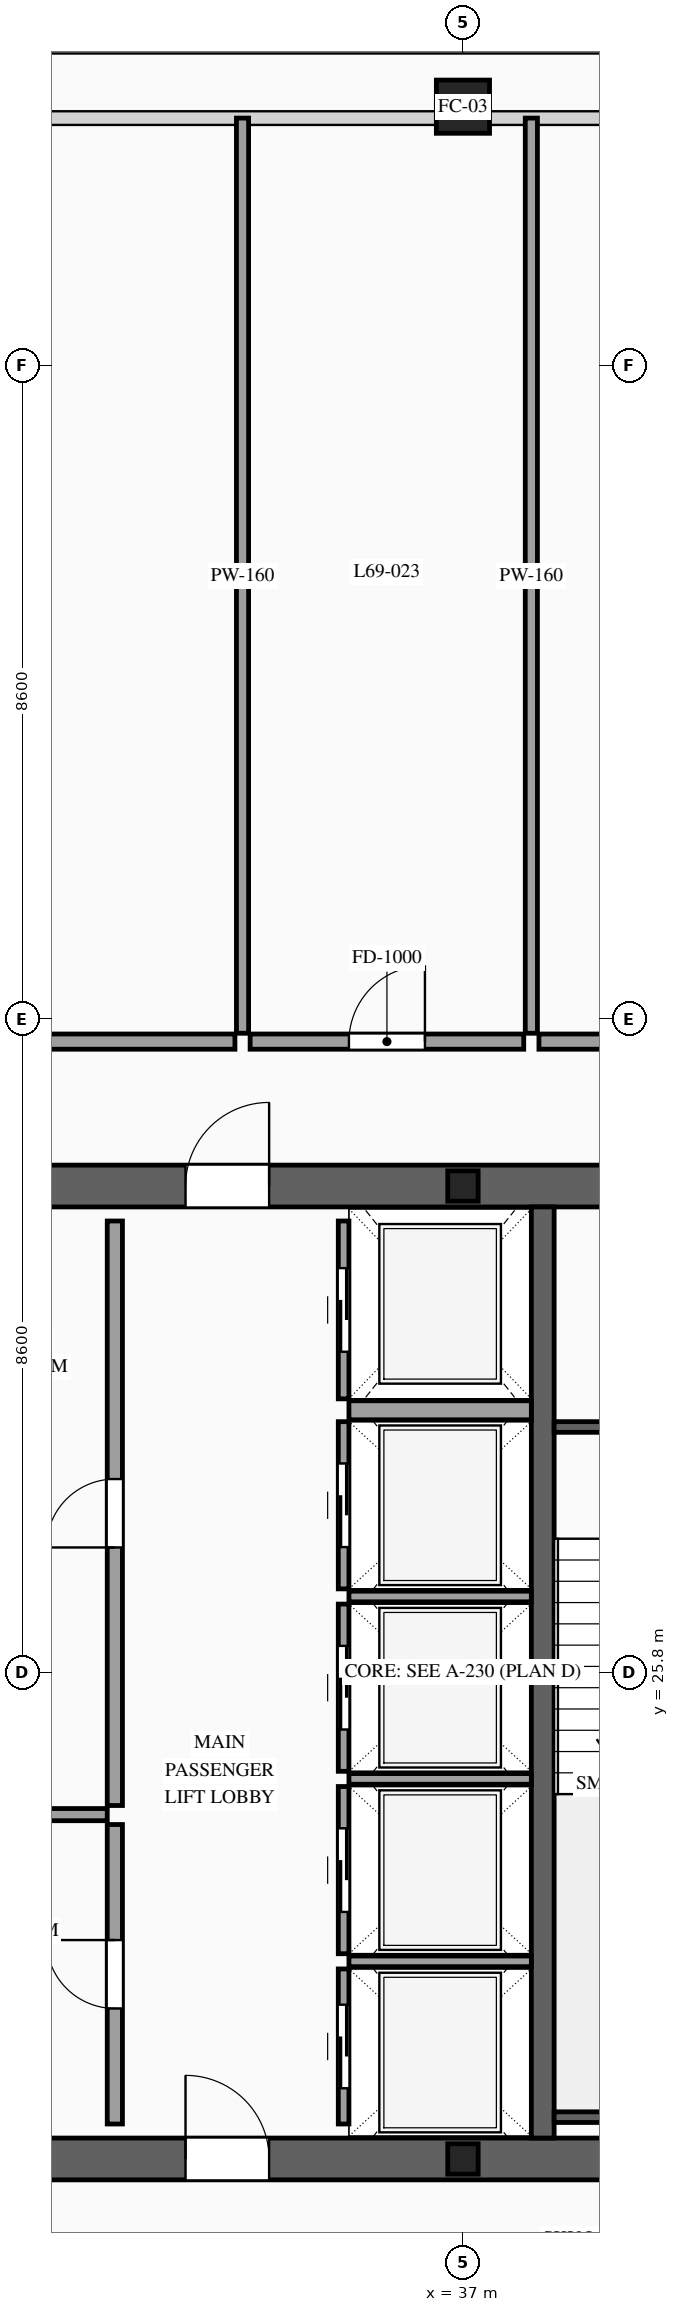
"""IFC4 building model, lengths in metres.
Left out: names, types, materials, properties, quantities, classifications, styles, units other than length and angle.
Written with IfcOpenShell. Run it as: python <this file> out.ifc"""

import sys

from ifc_helpers import new_model, si_unit, direction, frame, frame_2d, origin, origin_2d, place, context, subcontext, project, spatial, rectangle, hollow_rectangle, i_section, extrude, source, transform, mapped, element, fill, save


model = new_model("IFC4")
c1 = context("Model", 3, precision=1e-05, world=origin(), true_north=direction((0.0, 1.0)))
c2 = subcontext(c1, "Body", "Model", "MODEL_VIEW")
j1 = project(units=[si_unit("LENGTHUNIT", "METRE"), si_unit("PLANEANGLEUNIT", "RADIAN")], contexts=[c1])
p1 = place(None, origin())
s1 = spatial("IfcSite", under=j1, at=p1, CompositionType="ELEMENT")
p2 = place(p1, origin())
s2 = spatial("IfcBuilding", under=s1, at=p2, CompositionType="ELEMENT")
p3 = place(p2, frame((0.0, 0.0, 259.1)))
s3 = spatial("IfcBuildingStorey", under=s2, at=p3, CompositionType="ELEMENT", Elevation=259.1)
p4 = place(p3, frame((23.525, 19.4, 0.0), z_axis=(0.0, 0.0, 1.0), x_axis=(1.0, 0.0, 0.0)))
e1 = element("IfcWall", 1, at=p4, inside=s3, PredefinedType="SHEAR", context=c2, shape_type="SweptSolid", body=[
    extrude(rectangle(XDim=26.95, YDim=0.55, at=frame_2d((13.475, 0.0))), origin(), (0.0, 0.0, 1.0), 4.4),
])
p5 = place(p4, frame((1.925, 0.0, 0.0)))
e2 = element("IfcOpeningElement", 2, at=p5, cuts=e1, PredefinedType="OPENING", context=c2, shape_type="SweptSolid", body=[
    extrude(rectangle(XDim=1.1, YDim=2.2, at=frame_2d((0.55, 1.1))), frame((0.0, 0.29, 0.0), z_axis=(0.0, -1.0, 0.0), x_axis=(1.0, 0.0, 0.0)), (0.0, 0.0, 1.0), 0.58),
])
p6 = place(p4, frame((9.825, 0.0, 0.0)))
e3 = element("IfcOpeningElement", 3, at=p6, cuts=e1, PredefinedType="OPENING", context=c2, shape_type="SweptSolid", body=[
    extrude(rectangle(XDim=1.1, YDim=2.2, at=frame_2d((0.55, 1.1))), frame((0.0, 0.29, 0.0), z_axis=(0.0, -1.0, 0.0), x_axis=(1.0, 0.0, 0.0)), (0.0, 0.0, 1.0), 0.58),
])
p7 = place(p4, frame((23.025, 0.0, 0.0)))
e4 = element("IfcOpeningElement", 4, at=p7, cuts=e1, PredefinedType="OPENING", context=c2, shape_type="SweptSolid", body=[
    extrude(rectangle(XDim=1.1, YDim=2.2, at=frame_2d((0.55, 1.1))), frame((0.0, 0.29, 0.0), z_axis=(0.0, -1.0, 0.0), x_axis=(1.0, 0.0, 0.0)), (0.0, 0.0, 1.0), 0.58),
])
p8 = place(p4, frame((19.645, 0.0, 0.0)))
e5 = element("IfcOpeningElement", 5, at=p8, cuts=e1, PredefinedType="OPENING", context=c2, shape_type="SweptSolid", body=[
    extrude(rectangle(XDim=0.9, YDim=2.15, at=frame_2d((0.45, 1.075))), frame((0.0, 0.29, 0.0), z_axis=(0.0, -1.0, 0.0), x_axis=(1.0, 0.0, 0.0)), (0.0, 0.0, 1.0), 0.58),
])
p9 = place(p4, frame((18.205, 0.0, 0.0)))
e6 = element("IfcOpeningElement", 6, at=p9, cuts=e1, PredefinedType="OPENING", context=c2, shape_type="SweptSolid", body=[
    extrude(rectangle(XDim=0.9, YDim=2.15, at=frame_2d((0.45, 1.075))), frame((0.0, 0.29, 0.0), z_axis=(0.0, -1.0, 0.0), x_axis=(1.0, 0.0, 0.0)), (0.0, 0.0, 1.0), 0.58),
])
p10 = place(p3, frame((23.525, 32.2, 0.0), z_axis=(0.0, 0.0, 1.0), x_axis=(1.0, 0.0, 0.0)))
e7 = element("IfcWall", 7, at=p10, inside=s3, PredefinedType="SHEAR", context=c2, shape_type="SweptSolid", body=[
    extrude(rectangle(XDim=26.95, YDim=0.55, at=frame_2d((13.475, 0.0))), origin(), (0.0, 0.0, 1.0), 4.4),
])
p11 = place(p10, frame((4.545, 0.0, 0.0)))
e8 = element("IfcOpeningElement", 8, at=p11, cuts=e7, PredefinedType="OPENING", context=c2, shape_type="SweptSolid", body=[
    extrude(rectangle(XDim=0.9, YDim=2.15, at=frame_2d((0.45, 1.075))), frame((0.0, 0.29, 0.0), z_axis=(0.0, -1.0, 0.0), x_axis=(1.0, 0.0, 0.0)), (0.0, 0.0, 1.0), 0.58),
])
p12 = place(p10, frame((9.825, 0.0, 0.0)))
e9 = element("IfcOpeningElement", 9, at=p12, cuts=e7, PredefinedType="OPENING", context=c2, shape_type="SweptSolid", body=[
    extrude(rectangle(XDim=1.1, YDim=2.2, at=frame_2d((0.55, 1.1))), frame((0.0, 0.29, 0.0), z_axis=(0.0, -1.0, 0.0), x_axis=(1.0, 0.0, 0.0)), (0.0, 0.0, 1.0), 0.58),
])
p13 = place(p10, frame((15.675, 0.0, 0.0)))
e10 = element("IfcOpeningElement", 10, at=p13, cuts=e7, PredefinedType="OPENING", context=c2, shape_type="SweptSolid", body=[
    extrude(rectangle(XDim=1.1, YDim=2.2, at=frame_2d((0.55, 1.1))), frame((0.0, 0.29, 0.0), z_axis=(0.0, -1.0, 0.0), x_axis=(1.0, 0.0, 0.0)), (0.0, 0.0, 1.0), 0.58),
])
p14 = place(p10, frame((18.775, 0.0, 0.0)))
e11 = element("IfcOpeningElement", 11, at=p14, cuts=e7, PredefinedType="OPENING", context=c2, shape_type="SweptSolid", body=[
    extrude(rectangle(XDim=1.1, YDim=2.2, at=frame_2d((0.55, 1.1))), frame((0.0, 0.29, 0.0), z_axis=(0.0, -1.0, 0.0), x_axis=(1.0, 0.0, 0.0)), (0.0, 0.0, 1.0), 0.58),
])
m1 = source(origin(), c2, "Body", "SweptSolid", [
    extrude(rectangle(XDim=12.25, YDim=0.3, at=frame_2d((6.125, 0.0))), origin(), (0.0, 0.0, 1.0), 4.4),
])
p15 = place(p3, frame((38.05, 19.675, 0.0), z_axis=(0.0, 0.0, 1.0), x_axis=(0.0, 1.0, 0.0)))
e12 = element("IfcWall", 12, at=p15, inside=s3, PredefinedType="SOLIDWALL", context=c2, shape_type="MappedRepresentation", body=[
    mapped(m1, transform((0.0, 0.0, 0.0), scale=1.0)),
])
m2 = source(origin(), c2, "Body", "SweptSolid", [
    extrude(i_section(OverallWidth=0.4, OverallDepth=0.4, WebThickness=0.013, FlangeThickness=0.021, at=origin_2d()), origin(), (0.0, 0.0, 1.0), 4.4),
])
for number, where, z_axis, x_axis in (
    (13, (37.0, 19.4, 0.0), (0.0, 0.0, 1.0), (1.0, 0.0, 0.0)),
    (14, (37.0, 32.2, 0.0), (0.0, 0.0, 1.0), (1.0, 0.0, 0.0)),
):
    element("IfcColumn", number, at=place(p3, frame(where, z_axis=z_axis, x_axis=x_axis)), inside=s3, PredefinedType="COLUMN", context=c2, shape_type="MappedRepresentation", body=[
        mapped(m2, transform((0.0, 0.0, 0.0), scale=1.0)),
    ])
m3 = source(origin(), c2, "Body", "SweptSolid", [
    extrude(hollow_rectangle(XDim=0.7, YDim=0.7, WallThickness=0.032, at=origin_2d()), origin(), (0.0, 0.0, 1.0), 4.4),
])
p16 = place(p3, frame((37.0, 46.4, 0.0), z_axis=(0.0, 0.0, 1.0), x_axis=(1.0, 0.0, 0.0)))
e15 = element("IfcColumn", 15, at=p16, inside=s3, PredefinedType="COLUMN", context=c2, shape_type="MappedRepresentation", body=[
    mapped(m3, transform((0.0, 0.0, 0.0), scale=1.0)),
])
p17 = place(p3, frame((35.43, 19.86, 0.0), z_axis=(0.0, 0.0, 1.0), x_axis=(0.0, 1.0, 0.0)))
e16 = element("IfcWall", 16, at=p17, inside=s3, PredefinedType="SOLIDWALL", context=c2, shape_type="SweptSolid", body=[
    extrude(rectangle(XDim=2.04, YDim=0.14, at=frame_2d((1.02, 0.0))), origin(), (0.0, 0.0, 1.0), 4.12),
])
p18 = place(p17, frame((0.47, 0.0, 0.0)))
e17 = element("IfcOpeningElement", 17, at=p18, cuts=e16, PredefinedType="OPENING", context=c2, shape_type="SweptSolid", body=[
    extrude(rectangle(XDim=1.1, YDim=2.2, at=frame_2d((0.55, 1.1))), frame((0.0, 0.085, 0.0), z_axis=(0.0, -1.0, 0.0), x_axis=(1.0, 0.0, 0.0)), (0.0, 0.0, 1.0), 0.17),
])
m4 = source(origin(), c2, "Body", "SweptSolid", [
    extrude(rectangle(XDim=2.4, YDim=0.14, at=frame_2d((1.2, 0.0))), origin(), (0.0, 0.0, 1.0), 4.12),
])
p19 = place(p3, frame((35.5, 22.0, 0.0), z_axis=(0.0, 0.0, 1.0), x_axis=(1.0, 0.0, 0.0)))
e18 = element("IfcWall", 18, at=p19, inside=s3, PredefinedType="SOLIDWALL", context=c2, shape_type="MappedRepresentation", body=[
    mapped(m4, transform((0.0, 0.0, 0.0), scale=1.0)),
])
p20 = place(p3, frame((35.43, 22.1, 0.0), z_axis=(0.0, 0.0, 1.0), x_axis=(0.0, 1.0, 0.0)))
e19 = element("IfcWall", 19, at=p20, inside=s3, PredefinedType="SOLIDWALL", context=c2, shape_type="SweptSolid", body=[
    extrude(rectangle(XDim=2.2, YDim=0.14, at=frame_2d((1.1, 0.0))), origin(), (0.0, 0.0, 1.0), 4.12),
])
p21 = place(p20, frame((0.55, 0.0, 0.0)))
e20 = element("IfcOpeningElement", 20, at=p21, cuts=e19, PredefinedType="OPENING", context=c2, shape_type="SweptSolid", body=[
    extrude(rectangle(XDim=1.1, YDim=2.2, at=frame_2d((0.55, 1.1))), frame((0.0, 0.085, 0.0), z_axis=(0.0, -1.0, 0.0), x_axis=(1.0, 0.0, 0.0)), (0.0, 0.0, 1.0), 0.17),
])
p22 = place(p3, frame((35.5, 24.4, 0.0), z_axis=(0.0, 0.0, 1.0), x_axis=(1.0, 0.0, 0.0)))
e21 = element("IfcWall", 21, at=p22, inside=s3, PredefinedType="SOLIDWALL", context=c2, shape_type="MappedRepresentation", body=[
    mapped(m4, transform((0.0, 0.0, 0.0), scale=1.0)),
])
p23 = place(p3, frame((35.43, 24.5, 0.0), z_axis=(0.0, 0.0, 1.0), x_axis=(0.0, 1.0, 0.0)))
e22 = element("IfcWall", 22, at=p23, inside=s3, PredefinedType="SOLIDWALL", context=c2, shape_type="SweptSolid", body=[
    extrude(rectangle(XDim=2.2, YDim=0.14, at=frame_2d((1.1, 0.0))), origin(), (0.0, 0.0, 1.0), 4.12),
])
p24 = place(p23, frame((0.55, 0.0, 0.0)))
e23 = element("IfcOpeningElement", 23, at=p24, cuts=e22, PredefinedType="OPENING", context=c2, shape_type="SweptSolid", body=[
    extrude(rectangle(XDim=1.1, YDim=2.2, at=frame_2d((0.55, 1.1))), frame((0.0, 0.085, 0.0), z_axis=(0.0, -1.0, 0.0), x_axis=(1.0, 0.0, 0.0)), (0.0, 0.0, 1.0), 0.17),
])
p25 = place(p3, frame((35.5, 26.8, 0.0), z_axis=(0.0, 0.0, 1.0), x_axis=(1.0, 0.0, 0.0)))
e24 = element("IfcWall", 24, at=p25, inside=s3, PredefinedType="SOLIDWALL", context=c2, shape_type="MappedRepresentation", body=[
    mapped(m4, transform((0.0, 0.0, 0.0), scale=1.0)),
])
p26 = place(p3, frame((35.43, 26.9, 0.0), z_axis=(0.0, 0.0, 1.0), x_axis=(0.0, 1.0, 0.0)))
e25 = element("IfcWall", 25, at=p26, inside=s3, PredefinedType="SOLIDWALL", context=c2, shape_type="SweptSolid", body=[
    extrude(rectangle(XDim=2.2, YDim=0.14, at=frame_2d((1.1, 0.0))), origin(), (0.0, 0.0, 1.0), 4.12),
])
p27 = place(p26, frame((0.55, 0.0, 0.0)))
e26 = element("IfcOpeningElement", 26, at=p27, cuts=e25, PredefinedType="OPENING", context=c2, shape_type="SweptSolid", body=[
    extrude(rectangle(XDim=1.1, YDim=2.2, at=frame_2d((0.55, 1.1))), frame((0.0, 0.085, 0.0), z_axis=(0.0, -1.0, 0.0), x_axis=(1.0, 0.0, 0.0)), (0.0, 0.0, 1.0), 0.17),
])
p28 = place(p3, frame((35.43, 29.4, 0.0), z_axis=(0.0, 0.0, 1.0), x_axis=(0.0, 1.0, 0.0)))
e27 = element("IfcWall", 27, at=p28, inside=s3, PredefinedType="SOLIDWALL", context=c2, shape_type="SweptSolid", body=[
    extrude(rectangle(XDim=2.34, YDim=0.14, at=frame_2d((1.17, 0.0))), origin(), (0.0, 0.0, 1.0), 4.12),
])
p29 = place(p28, frame((0.62, 0.0, 0.0)))
e28 = element("IfcOpeningElement", 28, at=p29, cuts=e27, PredefinedType="OPENING", context=c2, shape_type="SweptSolid", body=[
    extrude(rectangle(XDim=1.1, YDim=2.2, at=frame_2d((0.55, 1.1))), frame((0.0, 0.085, 0.0), z_axis=(0.0, -1.0, 0.0), x_axis=(1.0, 0.0, 0.0)), (0.0, 0.0, 1.0), 0.17),
])
m5 = source(origin(), c2, "Body", "SweptSolid", [
    extrude(rectangle(XDim=2.4, YDim=0.25, at=frame_2d((1.2, 0.0))), origin(), (0.0, 0.0, 1.0), 4.12),
])
p30 = place(p3, frame((35.5, 29.25, 0.0), z_axis=(0.0, 0.0, 1.0), x_axis=(1.0, 0.0, 0.0)))
e29 = element("IfcWall", 29, at=p30, inside=s3, PredefinedType="SOLIDWALL", context=c2, shape_type="MappedRepresentation", body=[
    mapped(m5, transform((0.0, 0.0, 0.0), scale=1.0)),
])
p31 = place(p3, frame((38.2, 29.03, 0.0), z_axis=(0.0, 0.0, 1.0), x_axis=(1.0, 0.0, 0.0)))
e30 = element("IfcWall", 30, at=p31, inside=s3, PredefinedType="SOLIDWALL", context=c2, shape_type="SweptSolid", body=[
    extrude(rectangle(XDim=3.14, YDim=0.14, at=frame_2d((1.57, 0.0))), origin(), (0.0, 0.0, 1.0), 4.12),
])
p32 = place(p31, frame((1.02, 0.0, 0.0)))
e31 = element("IfcOpeningElement", 31, at=p32, cuts=e30, PredefinedType="OPENING", context=c2, shape_type="SweptSolid", body=[
    extrude(rectangle(XDim=1.1, YDim=2.2, at=frame_2d((0.55, 1.1))), frame((0.0, 0.085, 0.0), z_axis=(0.0, -1.0, 0.0), x_axis=(1.0, 0.0, 0.0)), (0.0, 0.0, 1.0), 0.17),
])
m6 = source(origin(), c2, "Body", "SweptSolid", [
    extrude(rectangle(XDim=3.14, YDim=0.14, at=frame_2d((1.57, 0.0))), origin(), (0.0, 0.0, 1.0), 4.12),
])
p33 = place(p3, frame((38.2, 19.95, 0.0), z_axis=(0.0, 0.0, 1.0), x_axis=(1.0, 0.0, 0.0)))
e32 = element("IfcWall", 32, at=p33, inside=s3, PredefinedType="SOLIDWALL", context=c2, shape_type="MappedRepresentation", body=[
    mapped(m6, transform((0.0, 0.0, 0.0), scale=1.0)),
])
p34 = place(p3, frame((32.42, 19.86, 0.0), z_axis=(0.0, 0.0, 1.0), x_axis=(0.0, 1.0, 0.0)))
e33 = element("IfcWall", 33, at=p34, inside=s3, PredefinedType="PARTITIONING", context=c2, shape_type="SweptSolid", body=[
    extrude(rectangle(XDim=3.94, YDim=0.2, at=frame_2d((1.97, 0.0))), origin(), (0.0, 0.0, 1.0), 4.12),
])
p35 = place(p34, frame((1.52, 0.0, 0.0)))
e34 = element("IfcOpeningElement", 34, at=p35, cuts=e33, PredefinedType="OPENING", context=c2, shape_type="SweptSolid", body=[
    extrude(rectangle(XDim=0.9, YDim=2.15, at=frame_2d((0.45, 1.075))), frame((0.0, 0.115, 0.0), z_axis=(0.0, -1.0, 0.0), x_axis=(1.0, 0.0, 0.0)), (0.0, 0.0, 1.0), 0.23),
])
p36 = place(p3, frame((32.42, 24.05, 0.0), z_axis=(0.0, 0.0, 1.0), x_axis=(0.0, 1.0, 0.0)))
e35 = element("IfcWall", 35, at=p36, inside=s3, PredefinedType="PARTITIONING", context=c2, shape_type="SweptSolid", body=[
    extrude(rectangle(XDim=7.69, YDim=0.2, at=frame_2d((3.845, 0.0))), origin(), (0.0, 0.0, 1.0), 4.12),
])
p37 = place(p36, frame((3.395, 0.0, 0.0)))
e36 = element("IfcOpeningElement", 36, at=p37, cuts=e35, PredefinedType="OPENING", context=c2, shape_type="SweptSolid", body=[
    extrude(rectangle(XDim=0.9, YDim=2.15, at=frame_2d((0.45, 1.075))), frame((0.0, 0.115, 0.0), z_axis=(0.0, -1.0, 0.0), x_axis=(1.0, 0.0, 0.0)), (0.0, 0.0, 1.0), 0.23),
])
m7 = source(origin(), c2, "Body", "SweptSolid", [
    extrude(rectangle(XDim=2.47, YDim=0.16, at=frame_2d((1.235, 0.0))), origin(), (0.0, 0.0, 1.0), 4.12),
])
p38 = place(p3, frame((29.85, 23.93, 0.0), z_axis=(0.0, 0.0, 1.0), x_axis=(1.0, 0.0, 0.0)))
e37 = element("IfcWall", 37, at=p38, inside=s3, PredefinedType="PARTITIONING", context=c2, shape_type="MappedRepresentation", body=[
    mapped(m7, transform((0.0, 0.0, 0.0), scale=1.0)),
])
p39 = place(p3, frame((19.44, 34.1, 0.0), z_axis=(0.0, 0.0, 1.0), x_axis=(1.0, 0.0, 0.0)))
e38 = element("IfcWall", 38, at=p39, inside=s3, PredefinedType="PARTITIONING", context=c2, shape_type="SweptSolid", body=[
    extrude(rectangle(XDim=14.56, YDim=0.2, at=frame_2d((7.28, 0.0))), origin(), (0.0, 0.0, 1.0), 4.12),
])
p40 = place(p39, frame((8.86, 0.0, 0.0)))
e39 = element("IfcOpeningElement", 39, at=p40, cuts=e38, PredefinedType="OPENING", context=c2, shape_type="SweptSolid", body=[
    extrude(rectangle(XDim=1.0, YDim=2.2, at=frame_2d((0.5, 1.1))), frame((0.0, 0.115, 0.0), z_axis=(0.0, -1.0, 0.0), x_axis=(1.0, 0.0, 0.0)), (0.0, 0.0, 1.0), 0.23),
])
m8 = source(origin(), c2, "Body", "SweptSolid", [
    extrude(rectangle(XDim=12.04, YDim=0.16, at=frame_2d((6.02, 0.0))), origin(), (0.0, 0.0, 1.0), 4.12),
])
p41 = place(p3, frame((34.1, 34.21, 0.0), z_axis=(0.0, 0.0, 1.0), x_axis=(0.0, 1.0, 0.0)))
e40 = element("IfcWall", 40, at=p41, inside=s3, PredefinedType="PARTITIONING", context=c2, shape_type="MappedRepresentation", body=[
    mapped(m8, transform((0.0, 0.0, 0.0), scale=1.0)),
])
p42 = place(p3, frame((34.2, 34.1, 0.0), z_axis=(0.0, 0.0, 1.0), x_axis=(1.0, 0.0, 0.0)))
e41 = element("IfcWall", 41, at=p42, inside=s3, PredefinedType="PARTITIONING", context=c2, shape_type="SweptSolid", body=[
    extrude(rectangle(XDim=3.6, YDim=0.2, at=frame_2d((1.8, 0.0))), origin(), (0.0, 0.0, 1.0), 4.12),
])
p43 = place(p42, frame((1.3, 0.0, 0.0)))
e42 = element("IfcOpeningElement", 42, at=p43, cuts=e41, PredefinedType="OPENING", context=c2, shape_type="SweptSolid", body=[
    extrude(rectangle(XDim=1.0, YDim=2.2, at=frame_2d((0.5, 1.1))), frame((0.0, 0.115, 0.0), z_axis=(0.0, -1.0, 0.0), x_axis=(1.0, 0.0, 0.0)), (0.0, 0.0, 1.0), 0.23),
])
p44 = place(p3, frame((37.9, 34.21, 0.0), z_axis=(0.0, 0.0, 1.0), x_axis=(0.0, 1.0, 0.0)))
e43 = element("IfcWall", 43, at=p44, inside=s3, PredefinedType="PARTITIONING", context=c2, shape_type="MappedRepresentation", body=[
    mapped(m8, transform((0.0, 0.0, 0.0), scale=1.0)),
])
p45 = place(p3, frame((38.0, 34.1, 0.0), z_axis=(0.0, 0.0, 1.0), x_axis=(1.0, 0.0, 0.0)))
e44 = element("IfcWall", 44, at=p45, inside=s3, PredefinedType="PARTITIONING", context=c2, shape_type="SweptSolid", body=[
    extrude(rectangle(XDim=5.4, YDim=0.2, at=frame_2d((2.7, 0.0))), origin(), (0.0, 0.0, 1.0), 4.12),
])
p46 = place(p45, frame((2.2, 0.0, 0.0)))
e45 = element("IfcOpeningElement", 45, at=p46, cuts=e44, PredefinedType="OPENING", context=c2, shape_type="SweptSolid", body=[
    extrude(rectangle(XDim=1.0, YDim=2.2, at=frame_2d((0.5, 1.1))), frame((0.0, 0.115, 0.0), z_axis=(0.0, -1.0, 0.0), x_axis=(1.0, 0.0, 0.0)), (0.0, 0.0, 1.0), 0.23),
])
m9 = source(origin(), c2, "Body", "SweptSolid", [
    extrude(rectangle(XDim=1.1, YDim=2.2, at=frame_2d((0.55, 1.1))), frame((0.0, 0.025, 0.0), z_axis=(0.0, -1.0, 0.0), x_axis=(1.0, 0.0, 0.0)), (0.0, 0.0, 1.0), 0.05),
])
p47 = place(p18, origin())
e46 = element("IfcDoor", 46, at=p47, inside=s3, OperationType="SLIDING_TO_RIGHT", PredefinedType="DOOR", context=c2, shape_type="MappedRepresentation", body=[
    mapped(m9, transform((0.0, 0.0, 0.0), scale=1.0)),
])
fill(e17, e46)
p48 = place(p21, origin())
e47 = element("IfcDoor", 47, at=p48, inside=s3, OperationType="SLIDING_TO_LEFT", PredefinedType="DOOR", context=c2, shape_type="MappedRepresentation", body=[
    mapped(m9, transform((0.0, 0.0, 0.0), scale=1.0)),
])
fill(e20, e47)
p49 = place(p24, origin())
e48 = element("IfcDoor", 48, at=p49, inside=s3, OperationType="SLIDING_TO_RIGHT", PredefinedType="DOOR", context=c2, shape_type="MappedRepresentation", body=[
    mapped(m9, transform((0.0, 0.0, 0.0), scale=1.0)),
])
fill(e23, e48)
p50 = place(p27, origin())
e49 = element("IfcDoor", 49, at=p50, inside=s3, OperationType="SLIDING_TO_LEFT", PredefinedType="DOOR", context=c2, shape_type="MappedRepresentation", body=[
    mapped(m9, transform((0.0, 0.0, 0.0), scale=1.0)),
])
fill(e26, e49)
p51 = place(p29, origin())
e50 = element("IfcDoor", 50, at=p51, inside=s3, OperationType="SLIDING_TO_RIGHT", PredefinedType="DOOR", context=c2, shape_type="MappedRepresentation", body=[
    mapped(m9, transform((0.0, 0.0, 0.0), scale=1.0)),
])
fill(e28, e50)
m10 = source(origin(), c2, "Body", "SweptSolid", [
    extrude(rectangle(XDim=1.1, YDim=2.2, at=frame_2d((0.55, 1.1))), frame((0.0, 0.025, 0.0), z_axis=(0.0, -1.0, 0.0), x_axis=(1.0, 0.0, 0.0)), (0.0, 0.0, 1.0), 0.05),
])
p52 = place(p6, origin())
e51 = element("IfcDoor", 51, at=p52, inside=s3, OperationType="SINGLE_SWING_LEFT", PredefinedType="DOOR", context=c2, shape_type="MappedRepresentation", body=[
    mapped(m10, transform((0.0, 0.0, 0.0), scale=1.0)),
])
fill(e3, e51)
p53 = place(p12, origin())
e52 = element("IfcDoor", 52, at=p53, inside=s3, OperationType="SINGLE_SWING_RIGHT", PredefinedType="DOOR", context=c2, shape_type="MappedRepresentation", body=[
    mapped(m10, transform((0.0, 0.0, 0.0), scale=1.0)),
])
fill(e9, e52)
m11 = source(origin(), c2, "Body", "SweptSolid", [
    extrude(rectangle(XDim=0.9, YDim=2.15, at=frame_2d((0.45, 1.075))), frame((0.0, 0.025, 0.0), z_axis=(0.0, -1.0, 0.0), x_axis=(1.0, 0.0, 0.0)), (0.0, 0.0, 1.0), 0.05),
])
p54 = place(p35, origin())
e53 = element("IfcDoor", 53, at=p54, inside=s3, OperationType="SINGLE_SWING_RIGHT", PredefinedType="DOOR", context=c2, shape_type="MappedRepresentation", body=[
    mapped(m11, transform((0.0, 0.0, 0.0), scale=1.0)),
])
fill(e34, e53)
p55 = place(p37, origin())
e54 = element("IfcDoor", 54, at=p55, inside=s3, OperationType="SINGLE_SWING_LEFT", PredefinedType="DOOR", context=c2, shape_type="MappedRepresentation", body=[
    mapped(m11, transform((0.0, 0.0, 0.0), scale=1.0)),
])
fill(e36, e54)
m12 = source(origin(), c2, "Body", "SweptSolid", [
    extrude(rectangle(XDim=1.0, YDim=2.2, at=frame_2d((0.5, 1.1))), frame((0.0, 0.025, 0.0), z_axis=(0.0, -1.0, 0.0), x_axis=(1.0, 0.0, 0.0)), (0.0, 0.0, 1.0), 0.05),
])
p56 = place(p43, origin())
e55 = element("IfcDoor", 55, at=p56, inside=s3, OperationType="SINGLE_SWING_RIGHT", PredefinedType="DOOR", context=c2, shape_type="MappedRepresentation", body=[
    mapped(m12, transform((0.0, 0.0, 0.0), scale=1.0)),
])
fill(e42, e55)
save(model, sys.argv[1])
